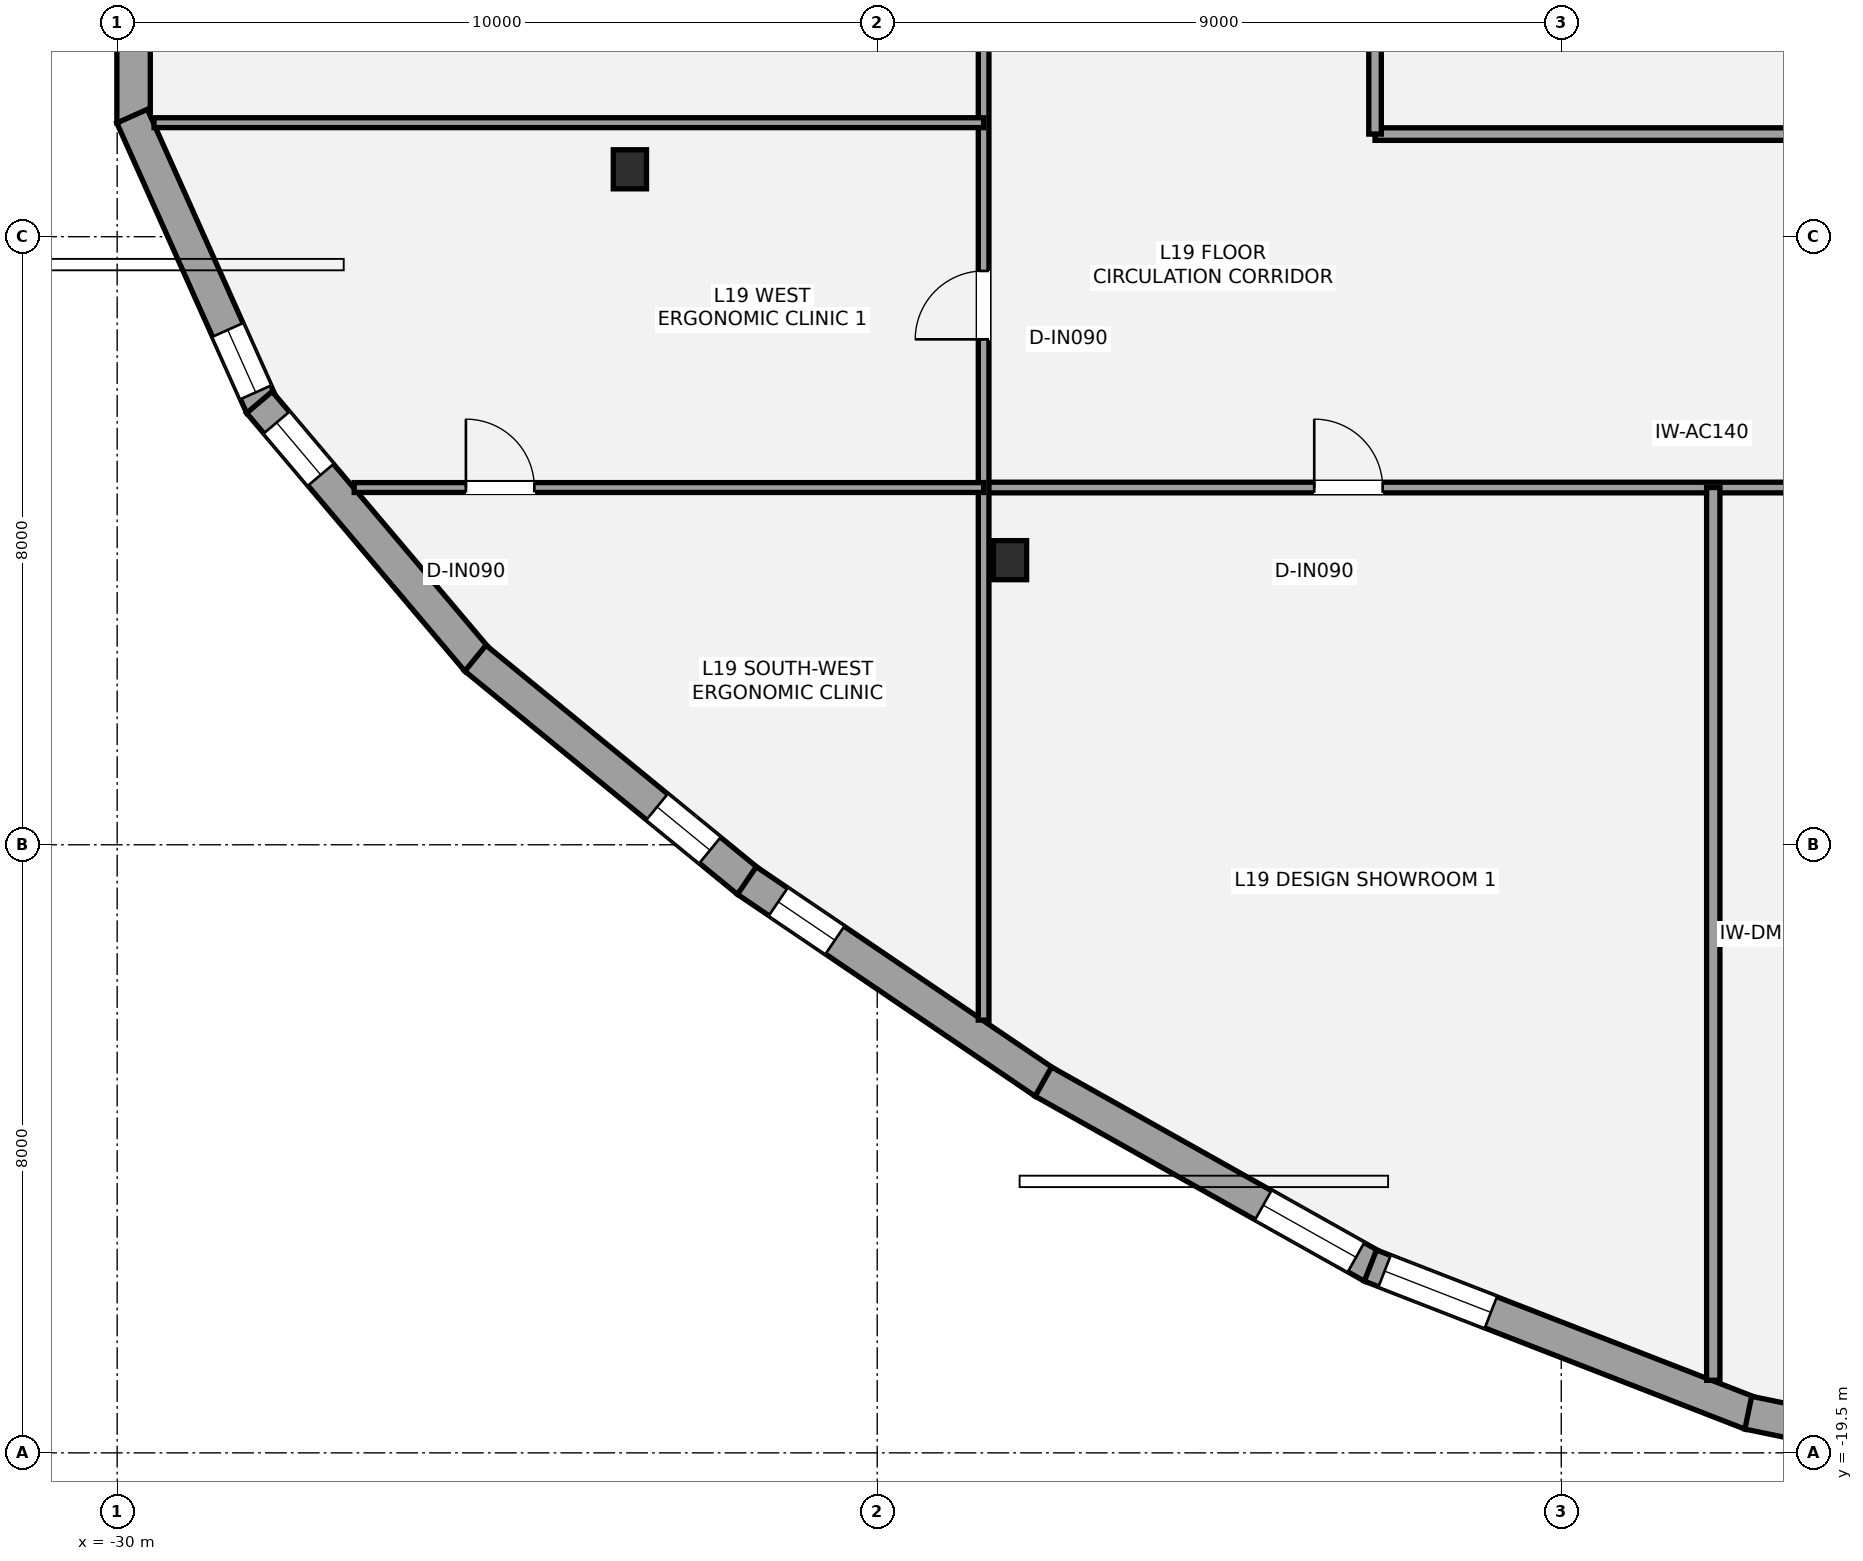
"""IFC4 building model, lengths in metres.
Left out: names, types, materials, properties, quantities, classifications, styles, units other than length and angle.
Written with IfcOpenShell. Run it as: python <this file> out.ifc"""

import sys

from ifc_helpers import new_model, si_unit, direction, frame, frame_2d, origin, origin_2d, place, context, subcontext, project, spatial, rectangle, i_section, extrude, element, fill, save


model = new_model("IFC4")
c1 = context("Model", 3, precision=1e-05, world=origin(), true_north=direction((0.0, 1.0)))
c2 = subcontext(c1, "Body", "Model", "MODEL_VIEW")
j1 = project(units=[si_unit("LENGTHUNIT", "METRE"), si_unit("PLANEANGLEUNIT", "RADIAN")], contexts=[c1])
p1 = place(None, origin())
s1 = spatial("IfcSite", under=j1, at=p1, CompositionType="ELEMENT")
p2 = place(p1, origin())
s2 = spatial("IfcBuilding", under=s1, at=p2, CompositionType="ELEMENT")
p3 = place(p2, frame((0.0, 0.0, 73.8)))
s3 = spatial("IfcBuildingStorey", under=s2, at=p3, CompositionType="ELEMENT", Elevation=73.8)
for number, where, z_axis, x_axis in (
    (1, (-23.254, -2.613, 0.0), (0.0, 0.0, 1.0), (1.0, 0.0, 0.0)),
    (2, (-18.253, -7.756, 0.0), (0.0, 0.0, 1.0), (1.0, 0.0, 0.0)),
):
    element("IfcColumn", number, at=place(p3, frame(where, z_axis=z_axis, x_axis=x_axis)), inside=s3, PredefinedType="COLUMN", context=c2, shape_type="SweptSolid", body=[
        extrude(i_section(OverallWidth=0.437, OverallDepth=0.514, WebThickness=0.061, FlangeThickness=0.097, at=origin_2d()), origin(), (0.0, 0.0, 1.0), 3.6),
    ])
p4 = place(p3, frame((-29.784, -2.004, 0.0), z_axis=(0.0, 0.0, 1.0), x_axis=(0.0, 1.0, 0.0)))
e3 = element("IfcWall", 3, at=p4, inside=s3, PredefinedType="STANDARD", context=c2, shape_type="SweptSolid", body=[
    extrude(rectangle(XDim=4.008, YDim=0.44, at=frame_2d((2.004, 0.0))), origin(), (0.0, 0.0, 1.0), 2.493),
])
p5 = place(p4, frame((2.76, 0.0, 0.58)))
e4 = element("IfcOpeningElement", 4, at=p5, cuts=e3, PredefinedType="OPENING", context=c2, shape_type="SweptSolid", body=[
    extrude(rectangle(XDim=0.9, YDim=1.35, at=frame_2d((0.45, 0.675))), frame((0.0, 0.23, 0.0), z_axis=(0.0, -1.0, 0.0), x_axis=(1.0, 0.0, 0.0)), (0.0, 0.0, 1.0), 0.46),
])
p6 = place(p3, frame((-28.096, -5.731, 0.0), z_axis=(0.0, 0.0, 1.0), x_axis=(-0.408380143708, 0.912811951184, 0.0)))
e5 = element("IfcWall", 5, at=p6, inside=s3, PredefinedType="STANDARD", context=c2, shape_type="SweptSolid", body=[
    extrude(rectangle(XDim=4.181, YDim=0.44, at=frame_2d((2.091, 0.0))), origin(), (0.0, 0.0, 1.0), 2.493),
])
p7 = place(p6, frame((0.2, 0.0, 0.58)))
e6 = element("IfcOpeningElement", 6, at=p7, cuts=e5, PredefinedType="OPENING", context=c2, shape_type="SweptSolid", body=[
    extrude(rectangle(XDim=0.9, YDim=1.35, at=frame_2d((0.45, 0.675))), frame((0.0, 0.23, 0.0), z_axis=(0.0, -1.0, 0.0), x_axis=(1.0, 0.0, 0.0)), (0.0, 0.0, 1.0), 0.46),
])
p8 = place(p3, frame((-25.258, -9.073, 0.0), z_axis=(0.0, 0.0, 1.0), x_axis=(-0.645698517297, 0.763592446767, 0.0)))
e7 = element("IfcWall", 7, at=p8, inside=s3, PredefinedType="STANDARD", context=c2, shape_type="SweptSolid", body=[
    extrude(rectangle(XDim=4.446, YDim=0.44, at=frame_2d((2.223, 0.0))), origin(), (0.0, 0.0, 1.0), 2.489),
])
p9 = place(p8, frame((3.196, 0.0, 0.58)))
e8 = element("IfcOpeningElement", 8, at=p9, cuts=e7, PredefinedType="OPENING", context=c2, shape_type="SweptSolid", body=[
    extrude(rectangle(XDim=0.9, YDim=1.35, at=frame_2d((0.45, 0.675))), frame((0.0, 0.23, 0.0), z_axis=(0.0, -1.0, 0.0), x_axis=(1.0, 0.0, 0.0)), (0.0, 0.0, 1.0), 0.46),
])
p10 = place(p3, frame((-21.699, -11.982, 0.0), z_axis=(0.0, 0.0, 1.0), x_axis=(-0.7737766342, 0.63345853879, 0.0)))
e9 = element("IfcWall", 9, at=p10, inside=s3, PredefinedType="STANDARD", context=c2, shape_type="SweptSolid", body=[
    extrude(rectangle(XDim=4.637, YDim=0.44, at=frame_2d((2.318, 0.0))), origin(), (0.0, 0.0, 1.0), 2.489),
])
p11 = place(p10, frame((0.648, 0.0, 0.58)))
e10 = element("IfcOpeningElement", 10, at=p11, cuts=e9, PredefinedType="OPENING", context=c2, shape_type="SweptSolid", body=[
    extrude(rectangle(XDim=0.9, YDim=1.35, at=frame_2d((0.45, 0.675))), frame((0.0, 0.23, 0.0), z_axis=(0.0, -1.0, 0.0), x_axis=(1.0, 0.0, 0.0)), (0.0, 0.0, 1.0), 0.46),
])
p12 = place(p3, frame((-17.799, -14.626, 0.0), z_axis=(0.0, 0.0, 1.0), x_axis=(-0.827650405372, 0.561243981249, 0.0)))
e11 = element("IfcWall", 11, at=p12, inside=s3, PredefinedType="STANDARD", context=c2, shape_type="SweptSolid", body=[
    extrude(rectangle(XDim=4.731, YDim=0.44, at=frame_2d((2.366, 0.0))), origin(), (0.0, 0.0, 1.0), 2.493),
])
p13 = place(p12, frame((3.333, 0.0, 0.58)))
e12 = element("IfcOpeningElement", 12, at=p13, cuts=e11, PredefinedType="OPENING", context=c2, shape_type="SweptSolid", body=[
    extrude(rectangle(XDim=0.9, YDim=1.35, at=frame_2d((0.45, 0.675))), frame((0.0, 0.23, 0.0), z_axis=(0.0, -1.0, 0.0), x_axis=(1.0, 0.0, 0.0)), (0.0, 0.0, 1.0), 0.46),
])
p14 = place(p3, frame((-13.483, -17.049, 0.0), z_axis=(0.0, 0.0, 1.0), x_axis=(-0.871887714573, 0.489705843519, 0.0)))
e13 = element("IfcWall", 13, at=p14, inside=s3, PredefinedType="STANDARD", context=c2, shape_type="SweptSolid", body=[
    extrude(rectangle(XDim=4.968, YDim=0.44, at=frame_2d((2.484, 0.0))), origin(), (0.0, 0.0, 1.0), 2.489),
])
p15 = place(p14, frame((0.25, 0.0, 0.45)))
e14 = element("IfcOpeningElement", 14, at=p15, cuts=e13, PredefinedType="OPENING", context=c2, shape_type="SweptSolid", body=[
    extrude(rectangle(XDim=1.4, YDim=1.55, at=frame_2d((0.7, 0.775))), frame((0.0, 0.23, 0.0), z_axis=(0.0, -1.0, 0.0), x_axis=(1.0, 0.0, 0.0)), (0.0, 0.0, 1.0), 0.46),
])
p16 = place(p3, frame((-8.504, -18.982, 0.0), z_axis=(0.0, 0.0, 1.0), x_axis=(-0.932040489001, 0.362354145641, 0.0)))
e15 = element("IfcWall", 15, at=p16, inside=s3, PredefinedType="STANDARD", context=c2, shape_type="SweptSolid", body=[
    extrude(rectangle(XDim=5.372, YDim=0.44, at=frame_2d((2.686, 0.0))), origin(), (0.0, 0.0, 1.0), 2.489),
])
p17 = place(p16, frame((3.672, 0.0, 0.48)))
e16 = element("IfcOpeningElement", 16, at=p17, cuts=e15, PredefinedType="OPENING", context=c2, shape_type="SweptSolid", body=[
    extrude(rectangle(XDim=1.5, YDim=1.7, at=frame_2d((0.75, 0.85))), frame((0.0, 0.23, 0.0), z_axis=(0.0, -1.0, 0.0), x_axis=(1.0, 0.0, 0.0)), (0.0, 0.0, 1.0), 0.46),
])
p18 = place(p3, frame((-2.911, -20.13, 0.0), z_axis=(0.0, 0.0, 1.0), x_axis=(-0.979485663347, 0.201513858821, 0.0)))
e17 = element("IfcWall", 17, at=p18, inside=s3, PredefinedType="STANDARD", context=c2, shape_type="SweptSolid", body=[
    extrude(rectangle(XDim=5.746, YDim=0.44, at=frame_2d((2.873, 0.0))), origin(), (0.0, 0.0, 1.0), 2.489),
])
p19 = place(p18, frame((0.25, 0.0, 0.65)))
e18 = element("IfcOpeningElement", 18, at=p19, cuts=e17, PredefinedType="OPENING", context=c2, shape_type="SweptSolid", body=[
    extrude(rectangle(XDim=1.5, YDim=1.7, at=frame_2d((0.75, 0.85))), frame((0.0, 0.23, 0.0), z_axis=(0.0, -1.0, 0.0), x_axis=(1.0, 0.0, 0.0)), (0.0, 0.0, 1.0), 0.46),
])
p20 = place(p3, frame((-13.45, -2.15, 0.0), z_axis=(0.0, 0.0, 1.0), x_axis=(1.0, 0.0, 0.0)))
e19 = element("IfcWall", 19, at=p20, inside=s3, PredefinedType="PARTITIONING", context=c2, shape_type="SweptSolid", body=[
    extrude(rectangle(XDim=6.25, YDim=0.165, at=frame_2d((3.125, 0.0))), origin(), (0.0, 0.0, 1.0), 2.813),
])
p21 = place(p3, frame((-13.45, -2.15, 0.0), z_axis=(0.0, 0.0, 1.0), x_axis=(0.0, 1.0, 0.0)))
e20 = element("IfcWall", 20, at=p21, inside=s3, PredefinedType="PARTITIONING", context=c2, shape_type="SweptSolid", body=[
    extrude(rectangle(XDim=3.15, YDim=0.165, at=frame_2d((1.575, 0.0))), origin(), (0.0, 0.0, 1.0), 2.813),
])
p22 = place(p21, frame((1.15, 0.0, 0.0)))
e21 = element("IfcOpeningElement", 21, at=p22, cuts=e20, PredefinedType="OPENING", context=c2, shape_type="SweptSolid", body=[
    extrude(rectangle(XDim=1.05, YDim=2.15, at=frame_2d((0.525, 1.075))), frame((0.0, 0.093, 0.0), z_axis=(0.0, -1.0, 0.0), x_axis=(1.0, 0.0, 0.0)), (0.0, 0.0, 1.0), 0.185),
])
p23 = place(p3, frame((-18.6, -6.8, 0.0), z_axis=(0.0, 0.0, 1.0), x_axis=(1.0, 0.0, 0.0)))
e22 = element("IfcWall", 22, at=p23, inside=s3, PredefinedType="PARTITIONING", context=c2, shape_type="SweptSolid", body=[
    extrude(rectangle(XDim=34.7, YDim=0.14, at=frame_2d((17.35, 0.0))), origin(), (0.0, 0.0, 1.0), 2.813),
])
p24 = place(p23, frame((4.35, 0.0, 0.0)))
e23 = element("IfcOpeningElement", 23, at=p24, cuts=e22, PredefinedType="OPENING", context=c2, shape_type="SweptSolid", body=[
    extrude(rectangle(XDim=0.9, YDim=2.1, at=frame_2d((0.45, 1.05))), frame((0.0, 0.08, 0.0), z_axis=(0.0, -1.0, 0.0), x_axis=(1.0, 0.0, 0.0)), (0.0, 0.0, 1.0), 0.16),
])
p25 = place(p23, frame((13.65, 0.0, 0.0)))
e24 = element("IfcOpeningElement", 24, at=p25, cuts=e22, PredefinedType="OPENING", context=c2, shape_type="SweptSolid", body=[
    extrude(rectangle(XDim=0.9, YDim=2.1, at=frame_2d((0.45, 1.05))), frame((0.0, 0.08, 0.0), z_axis=(0.0, -1.0, 0.0), x_axis=(1.0, 0.0, 0.0)), (0.0, 0.0, 1.0), 0.16),
])
p26 = place(p23, frame((22.65, 0.0, 0.0)))
e25 = element("IfcOpeningElement", 25, at=p26, cuts=e22, PredefinedType="OPENING", context=c2, shape_type="SweptSolid", body=[
    extrude(rectangle(XDim=0.9, YDim=2.1, at=frame_2d((0.45, 1.05))), frame((0.0, 0.08, 0.0), z_axis=(0.0, -1.0, 0.0), x_axis=(1.0, 0.0, 0.0)), (0.0, 0.0, 1.0), 0.16),
])
p27 = place(p23, frame((30.4, 0.0, 0.0)))
e26 = element("IfcOpeningElement", 26, at=p27, cuts=e22, PredefinedType="OPENING", context=c2, shape_type="SweptSolid", body=[
    extrude(rectangle(XDim=1.5, YDim=2.15, at=frame_2d((0.75, 1.075))), frame((0.0, 0.08, 0.0), z_axis=(0.0, -1.0, 0.0), x_axis=(1.0, 0.0, 0.0)), (0.0, 0.0, 1.0), 0.16),
])
p28 = place(p3, frame((-18.6, -13.807, 0.0), z_axis=(0.0, 0.0, 1.0), x_axis=(0.0, 1.0, 0.0)))
e27 = element("IfcWall", 27, at=p28, inside=s3, PredefinedType="PARTITIONING", context=c2, shape_type="SweptSolid", body=[
    extrude(rectangle(XDim=19.657, YDim=0.14, at=frame_2d((9.829, 0.0))), origin(), (0.0, 0.0, 1.0), 2.739),
])
p29 = place(p28, frame((8.957, 0.0, 0.0)))
e28 = element("IfcOpeningElement", 28, at=p29, cuts=e27, PredefinedType="OPENING", context=c2, shape_type="SweptSolid", body=[
    extrude(rectangle(XDim=0.9, YDim=2.1, at=frame_2d((0.45, 1.05))), frame((0.0, 0.08, 0.0), z_axis=(0.0, -1.0, 0.0), x_axis=(1.0, 0.0, 0.0)), (0.0, 0.0, 1.0), 0.16),
])
p30 = place(p28, frame((13.656, 0.0, 0.0)))
e29 = element("IfcOpeningElement", 29, at=p30, cuts=e27, PredefinedType="OPENING", context=c2, shape_type="SweptSolid", body=[
    extrude(rectangle(XDim=0.9, YDim=2.1, at=frame_2d((0.45, 1.05))), frame((0.0, 0.08, 0.0), z_axis=(0.0, -1.0, 0.0), x_axis=(1.0, 0.0, 0.0)), (0.0, 0.0, 1.0), 0.16),
])
p31 = place(p28, frame((17.582, 0.0, 0.0)))
e30 = element("IfcOpeningElement", 30, at=p31, cuts=e27, PredefinedType="OPENING", context=c2, shape_type="SweptSolid", body=[
    extrude(rectangle(XDim=0.9, YDim=2.1, at=frame_2d((0.45, 1.05))), frame((0.0, 0.08, 0.0), z_axis=(0.0, -1.0, 0.0), x_axis=(1.0, 0.0, 0.0)), (0.0, 0.0, 1.0), 0.16),
])
p32 = place(p3, frame((-9.0, -18.545, 0.0), z_axis=(0.0, 0.0, 1.0), x_axis=(0.0, 1.0, 0.0)))
e31 = element("IfcWall", 31, at=p32, inside=s3, PredefinedType="PARTITIONING", context=c2, shape_type="SweptSolid", body=[
    extrude(rectangle(XDim=11.745, YDim=0.175, at=frame_2d((5.873, 0.0))), origin(), (0.0, 0.0, 1.0), 2.813),
])
p33 = place(p3, frame((-26.882, -6.8, 0.0), z_axis=(0.0, 0.0, 1.0), x_axis=(1.0, 0.0, 0.0)))
e32 = element("IfcWall", 32, at=p33, inside=s3, PredefinedType="PARTITIONING", context=c2, shape_type="SweptSolid", body=[
    extrude(rectangle(XDim=8.281, YDim=0.13, at=frame_2d((4.141, 0.0))), origin(), (0.0, 0.0, 1.0), 2.739),
])
p34 = place(p33, frame((1.47, 0.0, 0.0)))
e33 = element("IfcOpeningElement", 33, at=p34, cuts=e32, PredefinedType="OPENING", context=c2, shape_type="SweptSolid", body=[
    extrude(rectangle(XDim=0.9, YDim=2.1, at=frame_2d((0.45, 1.05))), frame((0.0, 0.075, 0.0), z_axis=(0.0, -1.0, 0.0), x_axis=(1.0, 0.0, 0.0)), (0.0, 0.0, 1.0), 0.15),
])
p35 = place(p3, frame((-29.515, -2.0, 0.0), z_axis=(0.0, 0.0, 1.0), x_axis=(1.0, 0.0, 0.0)))
e34 = element("IfcWall", 34, at=p35, inside=s3, PredefinedType="PARTITIONING", context=c2, shape_type="SweptSolid", body=[
    extrude(rectangle(XDim=10.915, YDim=0.13, at=frame_2d((5.458, 0.0))), origin(), (0.0, 0.0, 1.0), 2.801),
])
p36 = place(p7, origin())
e35 = element("IfcWindow", 35, at=p36, inside=s3, PartitioningType="SINGLE_PANEL", PredefinedType="WINDOW", context=c2, shape_type="SweptSolid", body=[
    extrude(rectangle(XDim=0.9, YDim=1.35, at=frame_2d((0.45, 0.675))), frame((0.0, -0.01, 0.0), z_axis=(0.0, -1.0, 0.0), x_axis=(1.0, 0.0, 0.0)), (0.0, 0.0, 1.0), 0.06),
])
fill(e6, e35)
p37 = place(p9, origin())
e36 = element("IfcWindow", 36, at=p37, inside=s3, PartitioningType="SINGLE_PANEL", PredefinedType="WINDOW", context=c2, shape_type="SweptSolid", body=[
    extrude(rectangle(XDim=0.9, YDim=1.35, at=frame_2d((0.45, 0.675))), frame((0.0, -0.01, 0.0), z_axis=(0.0, -1.0, 0.0), x_axis=(1.0, 0.0, 0.0)), (0.0, 0.0, 1.0), 0.06),
])
fill(e8, e36)
p38 = place(p11, origin())
e37 = element("IfcWindow", 37, at=p38, inside=s3, PartitioningType="SINGLE_PANEL", PredefinedType="WINDOW", context=c2, shape_type="SweptSolid", body=[
    extrude(rectangle(XDim=0.9, YDim=1.35, at=frame_2d((0.45, 0.675))), frame((0.0, -0.01, 0.0), z_axis=(0.0, -1.0, 0.0), x_axis=(1.0, 0.0, 0.0)), (0.0, 0.0, 1.0), 0.06),
])
fill(e10, e37)
p39 = place(p13, origin())
e38 = element("IfcWindow", 38, at=p39, inside=s3, PartitioningType="SINGLE_PANEL", PredefinedType="WINDOW", context=c2, shape_type="SweptSolid", body=[
    extrude(rectangle(XDim=0.9, YDim=1.35, at=frame_2d((0.45, 0.675))), frame((0.0, -0.01, 0.0), z_axis=(0.0, -1.0, 0.0), x_axis=(1.0, 0.0, 0.0)), (0.0, 0.0, 1.0), 0.06),
])
fill(e12, e38)
p40 = place(p15, origin())
e39 = element("IfcWindow", 39, at=p40, inside=s3, PartitioningType="SINGLE_PANEL", PredefinedType="WINDOW", context=c2, shape_type="SweptSolid", body=[
    extrude(rectangle(XDim=1.4, YDim=1.55, at=frame_2d((0.7, 0.775))), frame((0.0, -0.01, 0.0), z_axis=(0.0, -1.0, 0.0), x_axis=(1.0, 0.0, 0.0)), (0.0, 0.0, 1.0), 0.06),
])
fill(e14, e39)
p41 = place(p17, origin())
e40 = element("IfcWindow", 40, at=p41, inside=s3, PartitioningType="SINGLE_PANEL", PredefinedType="WINDOW", context=c2, shape_type="SweptSolid", body=[
    extrude(rectangle(XDim=1.5, YDim=1.7, at=frame_2d((0.75, 0.85))), frame((0.0, -0.01, 0.0), z_axis=(0.0, -1.0, 0.0), x_axis=(1.0, 0.0, 0.0)), (0.0, 0.0, 1.0), 0.06),
])
fill(e16, e40)
p42 = place(p24, origin())
e41 = element("IfcDoor", 41, at=p42, inside=s3, OperationType="SINGLE_SWING_LEFT", PredefinedType="DOOR", context=c2, shape_type="SweptSolid", body=[
    extrude(rectangle(XDim=0.9, YDim=2.1, at=frame_2d((0.45, 1.05))), frame((0.0, 0.025, 0.0), z_axis=(0.0, -1.0, 0.0), x_axis=(1.0, 0.0, 0.0)), (0.0, 0.0, 1.0), 0.05),
])
fill(e23, e41)
p43 = place(p34, origin())
e42 = element("IfcDoor", 42, at=p43, inside=s3, OperationType="SINGLE_SWING_LEFT", PredefinedType="DOOR", context=c2, shape_type="SweptSolid", body=[
    extrude(rectangle(XDim=0.9, YDim=2.1, at=frame_2d((0.45, 1.05))), frame((0.0, 0.025, 0.0), z_axis=(0.0, -1.0, 0.0), x_axis=(1.0, 0.0, 0.0)), (0.0, 0.0, 1.0), 0.05),
])
fill(e33, e42)
p44 = place(p29, origin())
e43 = element("IfcDoor", 43, at=p44, inside=s3, OperationType="SINGLE_SWING_LEFT", PredefinedType="DOOR", context=c2, shape_type="SweptSolid", body=[
    extrude(rectangle(XDim=0.9, YDim=2.1, at=frame_2d((0.45, 1.05))), frame((0.0, 0.025, 0.0), z_axis=(0.0, -1.0, 0.0), x_axis=(1.0, 0.0, 0.0)), (0.0, 0.0, 1.0), 0.05),
])
fill(e28, e43)
save(model, sys.argv[1])
